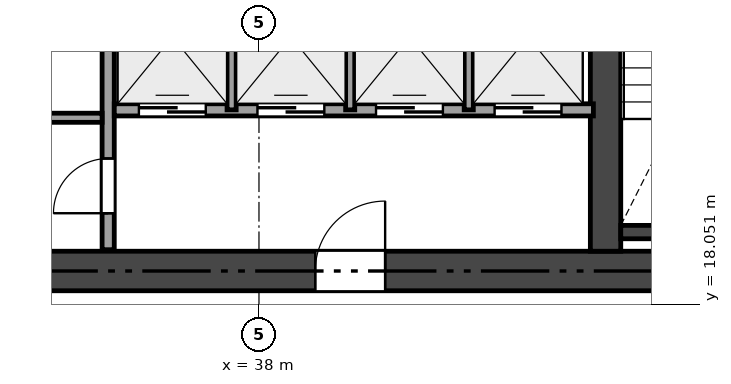
"""IFC4 building model, lengths in metres.
Left out: names, types, materials, properties, quantities, classifications, styles, units other than length and angle.
Written with IfcOpenShell. Run it as: python <this file> out.ifc"""

import sys

from ifc_helpers import new_model, si_unit, direction, frame, frame_2d, origin, place, context, subcontext, project, spatial, rectangle, extrude, element, fill, save


model = new_model("IFC4")
c1 = context("Model", 3, precision=1e-05, world=origin(), true_north=direction((0.0, 1.0)))
c2 = subcontext(c1, "Body", "Model", "MODEL_VIEW")
j1 = project(units=[si_unit("LENGTHUNIT", "METRE"), si_unit("PLANEANGLEUNIT", "RADIAN")], contexts=[c1])
p1 = place(None, origin())
s1 = spatial("IfcSite", under=j1, at=p1, CompositionType="ELEMENT")
p2 = place(p1, origin())
s2 = spatial("IfcBuilding", under=s1, at=p2, CompositionType="ELEMENT")
p3 = place(p2, frame((0.0, 0.0, 5.4)))
s3 = spatial("IfcBuildingStorey", under=s2, at=p3, CompositionType="ELEMENT", Elevation=5.4)
p4 = place(p3, frame((26.475, 18.6, 0.0), z_axis=(0.0, 0.0, 1.0), x_axis=(1.0, 0.0, 0.0)))
e1 = element("IfcWall", 1, at=p4, inside=s3, PredefinedType="SHEAR", context=c2, shape_type="SweptSolid", body=[
    extrude(rectangle(XDim=21.45, YDim=0.65, at=frame_2d((10.725, 0.0))), origin(), (0.0, 0.0, 1.0), 5.05),
])
p5 = place(p4, frame((12.45, 0.0, 0.0)))
e2 = element("IfcOpeningElement", 2, at=p5, cuts=e1, PredefinedType="OPENING", context=c2, shape_type="SweptSolid", body=[
    extrude(rectangle(XDim=1.15, YDim=2.15, at=frame_2d((0.575, 1.075))), frame((0.0, 0.335, 0.0), z_axis=(0.0, -1.0, 0.0), x_axis=(1.0, 0.0, 0.0)), (0.0, 0.0, 1.0), 0.67),
])
p6 = place(p4, frame((5.275, 0.0, 0.0)))
e3 = element("IfcOpeningElement", 3, at=p6, cuts=e1, PredefinedType="OPENING", context=c2, shape_type="SweptSolid", body=[
    extrude(rectangle(XDim=0.9, YDim=2.1, at=frame_2d((0.45, 1.05))), frame((0.0, 0.335, 0.0), z_axis=(0.0, -1.0, 0.0), x_axis=(1.0, 0.0, 0.0)), (0.0, 0.0, 1.0), 0.67),
])
p7 = place(p3, frame((43.7, 18.925, 0.0), z_axis=(0.0, 0.0, 1.0), x_axis=(0.0, 1.0, 0.0)))
e4 = element("IfcWall", 4, at=p7, inside=s3, PredefinedType="SHEAR", context=c2, shape_type="SweptSolid", body=[
    extrude(rectangle(XDim=14.95, YDim=0.5, at=frame_2d((7.475, 0.0))), origin(), (0.0, 0.0, 1.0), 5.05),
])
p8 = place(p7, frame((8.075, 0.0, 0.0)))
e5 = element("IfcOpeningElement", 5, at=p8, cuts=e4, PredefinedType="OPENING", context=c2, shape_type="SweptSolid", body=[
    extrude(rectangle(XDim=0.9, YDim=2.1, at=frame_2d((0.45, 1.05))), frame((0.0, 0.26, 0.0), z_axis=(0.0, -1.0, 0.0), x_axis=(1.0, 0.0, 0.0)), (0.0, 0.0, 1.0), 0.52),
])
p9 = place(p3, frame((43.95, 19.24, 0.0), z_axis=(0.0, 0.0, 1.0), x_axis=(1.0, 0.0, 0.0)))
e6 = element("IfcWall", 6, at=p9, inside=s3, PredefinedType="SHEAR", context=c2, shape_type="SweptSolid", body=[
    extrude(rectangle(XDim=3.325, YDim=0.22, at=frame_2d((1.663, 0.0))), origin(), (0.0, 0.0, 1.0), 5.05),
])
p10 = place(p3, frame((35.52, 18.95, 0.0), z_axis=(0.0, 0.0, 1.0), x_axis=(0.0, 1.0, 0.0)))
e7 = element("IfcWall", 7, at=p10, inside=s3, PredefinedType="SOLIDWALL", context=c2, shape_type="SweptSolid", body=[
    extrude(rectangle(XDim=14.9, YDim=0.2, at=frame_2d((7.45, 0.0))), origin(), (0.0, 0.0, 1.0), 4.571),
])
p11 = place(p10, frame((7.755, 0.0, 0.0)))
e8 = element("IfcOpeningElement", 8, at=p11, cuts=e7, PredefinedType="OPENING", context=c2, shape_type="SweptSolid", body=[
    extrude(rectangle(XDim=0.95, YDim=2.15, at=frame_2d((0.475, 1.075))), frame((0.0, 0.11, 0.0), z_axis=(0.0, -1.0, 0.0), x_axis=(1.0, 0.0, 0.0)), (0.0, 0.0, 1.0), 0.22),
])
p12 = place(p10, frame((0.6, 0.0, 0.0)))
e9 = element("IfcOpeningElement", 9, at=p12, cuts=e7, PredefinedType="OPENING", context=c2, shape_type="SweptSolid", body=[
    extrude(rectangle(XDim=0.9, YDim=2.1, at=frame_2d((0.45, 1.05))), frame((0.0, 0.11, 0.0), z_axis=(0.0, -1.0, 0.0), x_axis=(1.0, 0.0, 0.0)), (0.0, 0.0, 1.0), 0.22),
])
p13 = place(p3, frame((33.42, 21.12, 0.0), z_axis=(0.0, 0.0, 1.0), x_axis=(1.0, 0.0, 0.0)))
e10 = element("IfcWall", 10, at=p13, inside=s3, PredefinedType="PARTITIONING", context=c2, shape_type="SweptSolid", body=[
    extrude(rectangle(XDim=2.0, YDim=0.15, at=frame_2d((1.0, 0.0))), origin(), (0.0, 0.0, 1.0), 5.05),
])
p14 = place(p3, frame((35.62, 21.25, 0.0), z_axis=(0.0, 0.0, 1.0), x_axis=(1.0, 0.0, 0.0)))
e11 = element("IfcWall", 11, at=p14, inside=s3, PredefinedType="SOLIDWALL", context=c2, shape_type="SweptSolid", body=[
    extrude(rectangle(XDim=7.88, YDim=0.2, at=frame_2d((3.94, 0.0))), origin(), (0.0, 0.0, 1.0), 5.05),
])
p15 = place(p14, frame((0.405, 0.0, 0.0)))
e12 = element("IfcOpeningElement", 12, at=p15, cuts=e11, PredefinedType="OPENING", context=c2, shape_type="SweptSolid", body=[
    extrude(rectangle(XDim=1.1, YDim=2.15, at=frame_2d((0.55, 1.075))), frame((0.0, 0.11, 0.0), z_axis=(0.0, -1.0, 0.0), x_axis=(1.0, 0.0, 0.0)), (0.0, 0.0, 1.0), 0.22),
])
p16 = place(p14, frame((2.355, 0.0, 0.0)))
e13 = element("IfcOpeningElement", 13, at=p16, cuts=e11, PredefinedType="OPENING", context=c2, shape_type="SweptSolid", body=[
    extrude(rectangle(XDim=1.1, YDim=2.15, at=frame_2d((0.55, 1.075))), frame((0.0, 0.11, 0.0), z_axis=(0.0, -1.0, 0.0), x_axis=(1.0, 0.0, 0.0)), (0.0, 0.0, 1.0), 0.22),
])
p17 = place(p14, frame((4.305, 0.0, 0.0)))
e14 = element("IfcOpeningElement", 14, at=p17, cuts=e11, PredefinedType="OPENING", context=c2, shape_type="SweptSolid", body=[
    extrude(rectangle(XDim=1.1, YDim=2.15, at=frame_2d((0.55, 1.075))), frame((0.0, 0.11, 0.0), z_axis=(0.0, -1.0, 0.0), x_axis=(1.0, 0.0, 0.0)), (0.0, 0.0, 1.0), 0.22),
])
p18 = place(p14, frame((6.255, 0.0, 0.0)))
e15 = element("IfcOpeningElement", 15, at=p18, cuts=e11, PredefinedType="OPENING", context=c2, shape_type="SweptSolid", body=[
    extrude(rectangle(XDim=1.1, YDim=2.15, at=frame_2d((0.55, 1.075))), frame((0.0, 0.11, 0.0), z_axis=(0.0, -1.0, 0.0), x_axis=(1.0, 0.0, 0.0)), (0.0, 0.0, 1.0), 0.22),
])
for number, where, z_axis, x_axis in (
    (16, (37.55, 21.25, 0.0), (0.0, 0.0, 1.0), (0.0, 1.0, 0.0)),
    (17, (39.5, 21.25, 0.0), (0.0, 0.0, 1.0), (0.0, 1.0, 0.0)),
    (18, (41.45, 21.25, 0.0), (0.0, 0.0, 1.0), (0.0, 1.0, 0.0)),
):
    element("IfcWall", number, at=place(p3, frame(where, z_axis=z_axis, x_axis=x_axis)), inside=s3, PredefinedType="PARTITIONING", context=c2, shape_type="SweptSolid", body=[
        extrude(rectangle(XDim=2.4, YDim=0.15, at=frame_2d((1.2, 0.0))), origin(), (0.0, 0.0, 1.0), 4.571),
    ])
p19 = place(p5, origin())
e19 = element("IfcDoor", 19, at=p19, inside=s3, OperationType="SINGLE_SWING_RIGHT", PredefinedType="DOOR", context=c2, shape_type="SweptSolid", body=[
    extrude(rectangle(XDim=1.15, YDim=2.15, at=frame_2d((0.575, 1.075))), frame((0.0, 0.025, 0.0), z_axis=(0.0, -1.0, 0.0), x_axis=(1.0, 0.0, 0.0)), (0.0, 0.0, 1.0), 0.05),
])
fill(e2, e19)
p20 = place(p12, origin())
e20 = element("IfcDoor", 20, at=p20, inside=s3, OperationType="SINGLE_SWING_LEFT", PredefinedType="DOOR", context=c2, shape_type="SweptSolid", body=[
    extrude(rectangle(XDim=0.9, YDim=2.1, at=frame_2d((0.45, 1.05))), frame((0.0, 0.025, 0.0), z_axis=(0.0, -1.0, 0.0), x_axis=(1.0, 0.0, 0.0)), (0.0, 0.0, 1.0), 0.05),
])
fill(e9, e20)
p21 = place(p15, origin())
e21 = element("IfcDoor", 21, at=p21, inside=s3, OperationType="SLIDING_TO_LEFT", PredefinedType="DOOR", context=c2, shape_type="SweptSolid", body=[
    extrude(rectangle(XDim=1.1, YDim=2.15, at=frame_2d((0.55, 1.075))), frame((0.0, 0.025, 0.0), z_axis=(0.0, -1.0, 0.0), x_axis=(1.0, 0.0, 0.0)), (0.0, 0.0, 1.0), 0.05),
])
fill(e12, e21)
p22 = place(p16, origin())
e22 = element("IfcDoor", 22, at=p22, inside=s3, OperationType="SLIDING_TO_LEFT", PredefinedType="DOOR", context=c2, shape_type="SweptSolid", body=[
    extrude(rectangle(XDim=1.1, YDim=2.15, at=frame_2d((0.55, 1.075))), frame((0.0, 0.025, 0.0), z_axis=(0.0, -1.0, 0.0), x_axis=(1.0, 0.0, 0.0)), (0.0, 0.0, 1.0), 0.05),
])
fill(e13, e22)
p23 = place(p17, origin())
e23 = element("IfcDoor", 23, at=p23, inside=s3, OperationType="SLIDING_TO_LEFT", PredefinedType="DOOR", context=c2, shape_type="SweptSolid", body=[
    extrude(rectangle(XDim=1.1, YDim=2.15, at=frame_2d((0.55, 1.075))), frame((0.0, 0.025, 0.0), z_axis=(0.0, -1.0, 0.0), x_axis=(1.0, 0.0, 0.0)), (0.0, 0.0, 1.0), 0.05),
])
fill(e14, e23)
p24 = place(p18, origin())
e24 = element("IfcDoor", 24, at=p24, inside=s3, OperationType="SLIDING_TO_LEFT", PredefinedType="DOOR", context=c2, shape_type="SweptSolid", body=[
    extrude(rectangle(XDim=1.1, YDim=2.15, at=frame_2d((0.55, 1.075))), frame((0.0, 0.025, 0.0), z_axis=(0.0, -1.0, 0.0), x_axis=(1.0, 0.0, 0.0)), (0.0, 0.0, 1.0), 0.05),
])
fill(e15, e24)
save(model, sys.argv[1])
